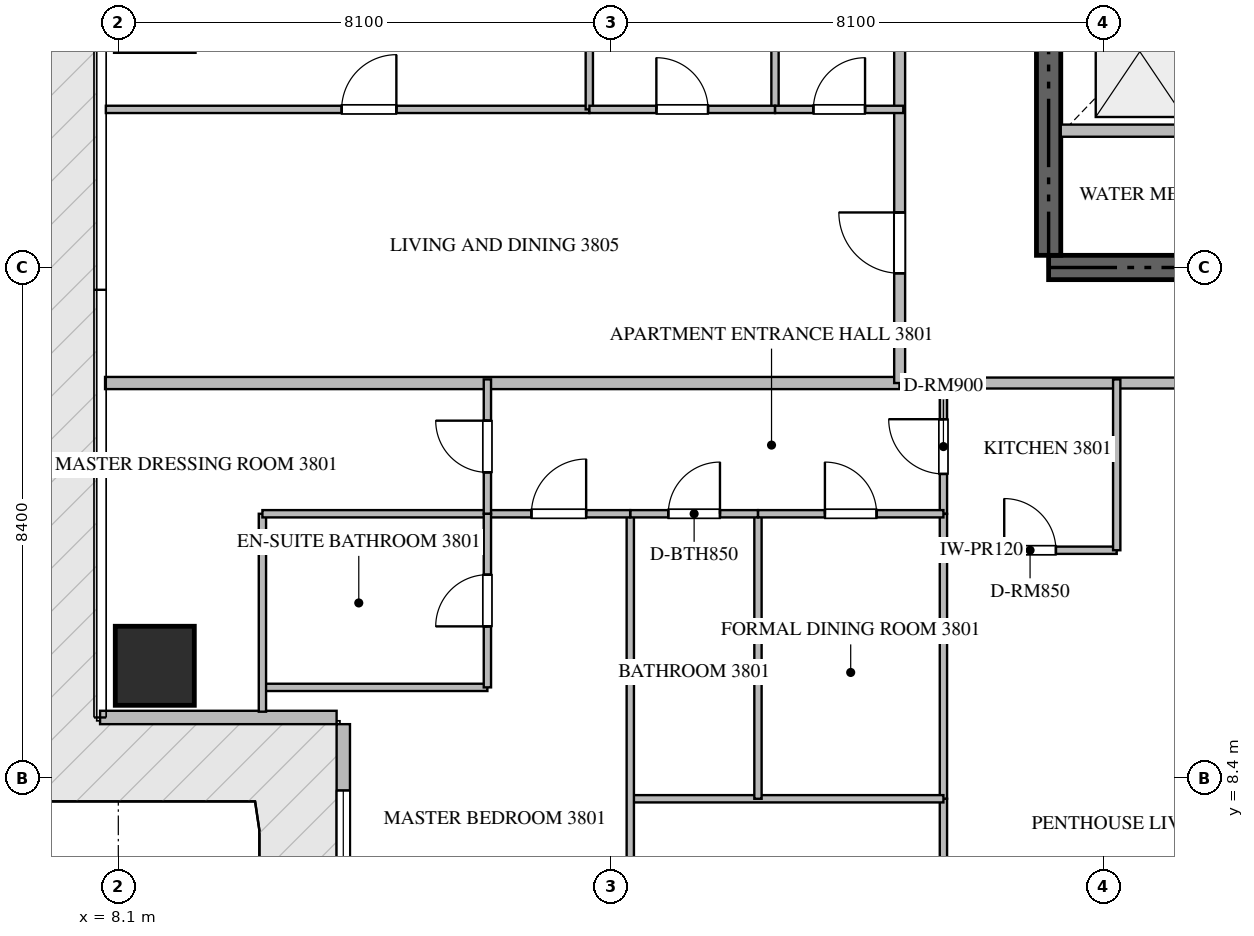
"""IFC4 building model, lengths in metres.
Left out: names, types, materials, properties, quantities, classifications, styles, units other than length and angle.
Written with IfcOpenShell. Run it as: python <this file> out.ifc"""

import sys

from ifc_helpers import new_model, si_unit, direction, frame, frame_2d, origin, origin_2d, place, context, subcontext, project, spatial, rectangle, extrude, source, transform, mapped, element, fill, save


model = new_model("IFC4")
c1 = context("Model", 3, precision=1e-05, world=origin(), true_north=direction((0.0, 1.0)))
c2 = subcontext(c1, "Body", "Model", "MODEL_VIEW")
j1 = project(units=[si_unit("LENGTHUNIT", "METRE"), si_unit("PLANEANGLEUNIT", "RADIAN")], contexts=[c1])
p1 = place(None, origin())
s1 = spatial("IfcSite", under=j1, at=p1, CompositionType="ELEMENT")
p2 = place(p1, origin())
s2 = spatial("IfcBuilding", under=s1, at=p2, CompositionType="ELEMENT")
p3 = place(p2, frame((0.0, 0.0, 153.9)))
s3 = spatial("IfcBuildingStorey", under=s2, at=p3, CompositionType="ELEMENT", Elevation=153.9)
p4 = place(p3, frame((23.4, 16.8, -0.26), z_axis=(0.0, 0.0, 1.0), x_axis=(1.0, 0.0, 0.0)))
e1 = element("IfcWall", 1, at=p4, inside=s3, PredefinedType="SHEAR", context=c2, shape_type="SweptSolid", body=[
    extrude(rectangle(XDim=18.0, YDim=0.4, at=frame_2d((9.0, 0.0))), origin(), (0.0, 0.0, 1.0), 3.748),
])
p5 = place(p3, frame((23.4, 17.0, -0.26), z_axis=(0.0, 0.0, 1.0), x_axis=(0.0, 1.0, 0.0)))
e2 = element("IfcWall", 2, at=p5, inside=s3, PredefinedType="SHEAR", context=c2, shape_type="SweptSolid", body=[
    extrude(rectangle(XDim=4.85, YDim=0.4, at=frame_2d((2.425, 0.0))), origin(), (0.0, 0.0, 1.0), 3.748),
])
m1 = source(origin(), c2, "Body", "SweptSolid", [
    extrude(rectangle(XDim=1.3, YDim=1.3, at=origin_2d()), origin(), (0.0, 0.0, 1.0), 3.75),
])
p6 = place(p3, frame((8.7, 10.25, -0.26), z_axis=(0.0, 0.0, 1.0), x_axis=(1.0, 0.0, 0.0)))
e3 = element("IfcColumn", 3, at=p6, inside=s3, PredefinedType="COLUMN", context=c2, shape_type="MappedRepresentation", body=[
    mapped(m1, transform((0.0, 0.0, 0.0), scale=1.0)),
])
p7 = place(p3, frame((7.8, 9.4, 0.0), z_axis=(0.0, 0.0, 1.0), x_axis=(1.0, 0.0, 0.0)))
e4 = element("IfcWall", 4, at=p7, inside=s3, PredefinedType="ELEMENTEDWALL", context=c2, shape_type="SweptSolid", body=[
    extrude(rectangle(XDim=3.89, YDim=0.22, at=frame_2d((1.945, 0.0))), origin(), (0.0, 0.0, 1.0), 3.475),
])
p8 = place(p3, frame((11.8, 9.29, 0.0), z_axis=(0.0, 0.0, 1.0), x_axis=(0.0, -1.0, 0.0)))
e5 = element("IfcWall", 5, at=p8, inside=s3, PredefinedType="ELEMENTEDWALL", context=c2, shape_type="SweptSolid", body=[
    extrude(rectangle(XDim=3.78, YDim=0.22, at=frame_2d((1.89, 0.0))), origin(), (0.0, 0.0, 1.0), 3.475),
])
p9 = place(p8, frame((1.09, 0.0, 0.65)))
e6 = element("IfcOpeningElement", 6, at=p9, cuts=e5, PredefinedType="OPENING", context=c2, shape_type="SweptSolid", body=[
    extrude(rectangle(XDim=1.6, YDim=2.1, at=frame_2d((0.8, 1.05))), frame((0.0, 0.12, 0.0), z_axis=(0.0, -1.0, 0.0), x_axis=(1.0, 0.0, 0.0)), (0.0, 0.0, 1.0), 0.24),
])
p10 = place(p3, frame((23.6, 19.05, 0.0), z_axis=(0.0, 0.0, 1.0), x_axis=(1.0, 0.0, 0.0)))
e7 = element("IfcWall", 7, at=p10, inside=s3, PredefinedType="STANDARD", context=c2, shape_type="SweptSolid", body=[
    extrude(rectangle(XDim=2.45, YDim=0.2, at=frame_2d((1.225, 0.0))), origin(), (0.0, 0.0, 1.0), 3.49),
])
p11 = place(p3, frame((7.882, 14.9, 0.0), z_axis=(0.0, 0.0, 1.0), x_axis=(1.0, 0.0, 0.0)))
e8 = element("IfcWall", 8, at=p11, inside=s3, PredefinedType="PARTITIONING", context=c2, shape_type="SweptSolid", body=[
    extrude(rectangle(XDim=13.068, YDim=0.2, at=frame_2d((6.534, 0.0))), origin(), (0.0, 0.0, 1.0), 3.49),
])
p12 = place(p3, frame((20.952, 14.9, 0.0), z_axis=(0.0, 0.0, 1.0), x_axis=(1.0, 0.0, 0.0)))
e9 = element("IfcWall", 9, at=p12, inside=s3, PredefinedType="PARTITIONING", context=c2, shape_type="SweptSolid", body=[
    extrude(rectangle(XDim=22.896, YDim=0.18, at=frame_2d((11.448, 0.0))), origin(), (0.0, 0.0, 1.0), 3.49),
])
p13 = place(p12, frame((5.934, 0.0, 0.0)))
e10 = element("IfcOpeningElement", 10, at=p13, cuts=e9, PredefinedType="OPENING", context=c2, shape_type="SweptSolid", body=[
    extrude(rectangle(XDim=1.0, YDim=2.15, at=frame_2d((0.5, 1.075))), frame((0.0, 0.1, 0.0), z_axis=(0.0, -1.0, 0.0), x_axis=(1.0, 0.0, 0.0)), (0.0, 0.0, 1.0), 0.2),
])
p14 = place(p12, frame((16.51, 0.0, 0.0)))
e11 = element("IfcOpeningElement", 11, at=p14, cuts=e9, PredefinedType="OPENING", context=c2, shape_type="SweptSolid", body=[
    extrude(rectangle(XDim=1.0, YDim=2.15, at=frame_2d((0.5, 1.075))), frame((0.0, 0.1, 0.0), z_axis=(0.0, -1.0, 0.0), x_axis=(1.0, 0.0, 0.0)), (0.0, 0.0, 1.0), 0.2),
])
p15 = place(p3, frame((20.95, 14.9, 0.0), z_axis=(0.0, 0.0, 1.0), x_axis=(0.0, 1.0, 0.0)))
e12 = element("IfcWall", 12, at=p15, inside=s3, PredefinedType="PARTITIONING", context=c2, shape_type="SweptSolid", body=[
    extrude(rectangle(XDim=18.7, YDim=0.18, at=frame_2d((9.35, 0.0))), origin(), (0.0, 0.0, 1.0), 3.49),
])
p16 = place(p15, frame((1.805, 0.0, 0.0)))
e13 = element("IfcOpeningElement", 13, at=p16, cuts=e12, PredefinedType="OPENING", context=c2, shape_type="SweptSolid", body=[
    extrude(rectangle(XDim=1.0, YDim=2.15, at=frame_2d((0.5, 1.075))), frame((0.0, 0.1, 0.0), z_axis=(0.0, -1.0, 0.0), x_axis=(1.0, 0.0, 0.0)), (0.0, 0.0, 1.0), 0.2),
])
p17 = place(p15, frame((15.027, 0.0, 0.0)))
e14 = element("IfcOpeningElement", 14, at=p17, cuts=e12, PredefinedType="OPENING", context=c2, shape_type="SweptSolid", body=[
    extrude(rectangle(XDim=1.0, YDim=2.15, at=frame_2d((0.5, 1.075))), frame((0.0, 0.1, 0.0), z_axis=(0.0, -1.0, 0.0), x_axis=(1.0, 0.0, 0.0)), (0.0, 0.0, 1.0), 0.2),
])
p18 = place(p3, frame((21.67, 12.15, 0.0), z_axis=(0.0, 0.0, 1.0), x_axis=(1.0, 0.0, 0.0)))
e15 = element("IfcWall", 15, at=p18, inside=s3, PredefinedType="PARTITIONING", context=c2, shape_type="SweptSolid", body=[
    extrude(rectangle(XDim=2.85, YDim=0.12, at=frame_2d((1.425, 0.0))), origin(), (0.0, 0.0, 1.0), 3.49),
])
p19 = place(p18, frame((1.0, 0.0, 0.0)))
e16 = element("IfcOpeningElement", 16, at=p19, cuts=e15, PredefinedType="OPENING", context=c2, shape_type="SweptSolid", body=[
    extrude(rectangle(XDim=0.85, YDim=2.1, at=frame_2d((0.425, 1.05))), frame((0.0, 0.07, 0.0), z_axis=(0.0, -1.0, 0.0), x_axis=(1.0, 0.0, 0.0)), (0.0, 0.0, 1.0), 0.14),
])
p20 = place(p3, frame((24.52, 12.15, 0.0), z_axis=(0.0, 0.0, 1.0), x_axis=(0.0, 1.0, 0.0)))
e17 = element("IfcWall", 17, at=p20, inside=s3, PredefinedType="PARTITIONING", context=c2, shape_type="SweptSolid", body=[
    extrude(rectangle(XDim=2.81, YDim=0.12, at=frame_2d((1.405, 0.0))), origin(), (0.0, 0.0, 1.0), 3.49),
])
p21 = place(p3, frame((21.67, 12.75, 0.0), z_axis=(0.0, 0.0, 1.0), x_axis=(0.0, 1.0, 0.0)))
e18 = element("IfcWall", 18, at=p21, inside=s3, PredefinedType="PARTITIONING", context=c2, shape_type="SweptSolid", body=[
    extrude(rectangle(XDim=2.21, YDim=0.12, at=frame_2d((1.105, 0.0))), origin(), (0.0, 0.0, 1.0), 3.49),
])
p22 = place(p21, frame((0.655, 0.0, 0.0)))
e19 = element("IfcOpeningElement", 19, at=p22, cuts=e18, PredefinedType="OPENING", context=c2, shape_type="SweptSolid", body=[
    extrude(rectangle(XDim=0.9, YDim=2.1, at=frame_2d((0.45, 1.05))), frame((0.0, 0.07, 0.0), z_axis=(0.0, -1.0, 0.0), x_axis=(1.0, 0.0, 0.0)), (0.0, 0.0, 1.0), 0.14),
])
p23 = place(p3, frame((21.67, 1.495, 0.0), z_axis=(0.0, 0.0, 1.0), x_axis=(0.0, 1.0, 0.0)))
e20 = element("IfcWall", 20, at=p23, inside=s3, PredefinedType="PARTITIONING", context=c2, shape_type="SweptSolid", body=[
    extrude(rectangle(XDim=6.568, YDim=0.12, at=frame_2d((3.284, 0.0))), origin(), (0.0, 0.0, 1.0), 3.49),
])
p24 = place(p23, frame((3.117, 0.0, 0.0)))
e21 = element("IfcOpeningElement", 21, at=p24, cuts=e20, PredefinedType="OPENING", context=c2, shape_type="SweptSolid", body=[
    extrude(rectangle(XDim=0.9, YDim=2.1, at=frame_2d((0.45, 1.05))), frame((0.0, 0.07, 0.0), z_axis=(0.0, -1.0, 0.0), x_axis=(1.0, 0.0, 0.0)), (0.0, 0.0, 1.0), 0.14),
])
p25 = place(p3, frame((21.67, 8.065, 0.0), z_axis=(0.0, 0.0, 1.0), x_axis=(0.0, 1.0, 0.0)))
e22 = element("IfcWall", 22, at=p25, inside=s3, PredefinedType="PARTITIONING", context=c2, shape_type="SweptSolid", body=[
    extrude(rectangle(XDim=4.683, YDim=0.12, at=frame_2d((2.342, 0.0))), origin(), (0.0, 0.0, 1.0), 3.49),
])
p26 = place(p3, frame((16.52, 8.063, 0.0), z_axis=(0.0, 0.0, 1.0), x_axis=(1.0, 0.0, 0.0)))
e23 = element("IfcWall", 23, at=p26, inside=s3, PredefinedType="PARTITIONING", context=c2, shape_type="SweptSolid", body=[
    extrude(rectangle(XDim=5.15, YDim=0.12, at=frame_2d((2.575, 0.0))), origin(), (0.0, 0.0, 1.0), 3.49),
])
p27 = place(p3, frame((16.52, 1.495, 0.0), z_axis=(0.0, 0.0, 1.0), x_axis=(0.0, 1.0, 0.0)))
e24 = element("IfcWall", 24, at=p27, inside=s3, PredefinedType="PARTITIONING", context=c2, shape_type="SweptSolid", body=[
    extrude(rectangle(XDim=11.255, YDim=0.12, at=frame_2d((5.627, 0.0))), origin(), (0.0, 0.0, 1.0), 2.972),
])
p28 = place(p3, frame((18.62, 8.063, 0.0), z_axis=(0.0, 0.0, 1.0), x_axis=(0.0, 1.0, 0.0)))
e25 = element("IfcWall", 25, at=p28, inside=s3, PredefinedType="PARTITIONING", context=c2, shape_type="SweptSolid", body=[
    extrude(rectangle(XDim=4.687, YDim=0.12, at=frame_2d((2.344, 0.0))), origin(), (0.0, 0.0, 1.0), 3.49),
])
p29 = place(p3, frame((16.52, 12.75, 0.0), z_axis=(0.0, 0.0, 1.0), x_axis=(1.0, 0.0, 0.0)))
e26 = element("IfcWall", 26, at=p29, inside=s3, PredefinedType="PARTITIONING", context=c2, shape_type="SweptSolid", body=[
    extrude(rectangle(XDim=2.1, YDim=0.12, at=frame_2d((1.05, 0.0))), origin(), (0.0, 0.0, 1.0), 3.49),
])
p30 = place(p29, frame((0.625, 0.0, 0.0)))
e27 = element("IfcOpeningElement", 27, at=p30, cuts=e26, PredefinedType="OPENING", context=c2, shape_type="SweptSolid", body=[
    extrude(rectangle(XDim=0.85, YDim=2.1, at=frame_2d((0.425, 1.05))), frame((0.0, 0.07, 0.0), z_axis=(0.0, -1.0, 0.0), x_axis=(1.0, 0.0, 0.0)), (0.0, 0.0, 1.0), 0.14),
])
p31 = place(p3, frame((18.622, 12.75, 0.0), z_axis=(0.0, 0.0, 1.0), x_axis=(1.0, 0.0, 0.0)))
e28 = element("IfcWall", 28, at=p31, inside=s3, PredefinedType="PARTITIONING", context=c2, shape_type="SweptSolid", body=[
    extrude(rectangle(XDim=3.048, YDim=0.12, at=frame_2d((1.524, 0.0))), origin(), (0.0, 0.0, 1.0), 3.49),
])
p32 = place(p31, frame((1.099, 0.0, 0.0)))
e29 = element("IfcOpeningElement", 29, at=p32, cuts=e28, PredefinedType="OPENING", context=c2, shape_type="SweptSolid", body=[
    extrude(rectangle(XDim=0.85, YDim=2.1, at=frame_2d((0.425, 1.05))), frame((0.0, 0.07, 0.0), z_axis=(0.0, -1.0, 0.0), x_axis=(1.0, 0.0, 0.0)), (0.0, 0.0, 1.0), 0.14),
])
p33 = place(p3, frame((14.17, 12.75, 0.0), z_axis=(0.0, 0.0, 1.0), x_axis=(1.0, 0.0, 0.0)))
e30 = element("IfcWall", 30, at=p33, inside=s3, PredefinedType="PARTITIONING", context=c2, shape_type="SweptSolid", body=[
    extrude(rectangle(XDim=2.348, YDim=0.12, at=frame_2d((1.174, 0.0))), origin(), (0.0, 0.0, 1.0), 3.49),
])
p34 = place(p33, frame((0.724, 0.0, 0.0)))
e31 = element("IfcOpeningElement", 31, at=p34, cuts=e30, PredefinedType="OPENING", context=c2, shape_type="SweptSolid", body=[
    extrude(rectangle(XDim=0.9, YDim=2.1, at=frame_2d((0.45, 1.05))), frame((0.0, 0.07, 0.0), z_axis=(0.0, -1.0, 0.0), x_axis=(1.0, 0.0, 0.0)), (0.0, 0.0, 1.0), 0.14),
])
p35 = place(p3, frame((10.47, 9.895, 0.0), z_axis=(0.0, 0.0, 1.0), x_axis=(1.0, 0.0, 0.0)))
e32 = element("IfcWall", 32, at=p35, inside=s3, PredefinedType="PARTITIONING", context=c2, shape_type="SweptSolid", body=[
    extrude(rectangle(XDim=3.7, YDim=0.12, at=frame_2d((1.85, 0.0))), origin(), (0.0, 0.0, 1.0), 3.49),
])
p36 = place(p3, frame((10.47, 9.495, 0.0), z_axis=(0.0, 0.0, 1.0), x_axis=(0.0, 1.0, 0.0)))
e33 = element("IfcWall", 33, at=p36, inside=s3, PredefinedType="PARTITIONING", context=c2, shape_type="SweptSolid", body=[
    extrude(rectangle(XDim=3.255, YDim=0.12, at=frame_2d((1.627, 0.0))), origin(), (0.0, 0.0, 1.0), 3.49),
])
p37 = place(p3, frame((10.47, 12.75, 0.0), z_axis=(0.0, 0.0, 1.0), x_axis=(1.0, 0.0, 0.0)))
e34 = element("IfcWall", 34, at=p37, inside=s3, PredefinedType="PARTITIONING", context=c2, shape_type="SweptSolid", body=[
    extrude(rectangle(XDim=3.698, YDim=0.12, at=frame_2d((1.849, 0.0))), origin(), (0.0, 0.0, 1.0), 3.49),
])
p38 = place(p3, frame((14.17, 9.895, 0.0), z_axis=(0.0, 0.0, 1.0), x_axis=(0.0, 1.0, 0.0)))
e35 = element("IfcWall", 35, at=p38, inside=s3, PredefinedType="PARTITIONING", context=c2, shape_type="SweptSolid", body=[
    extrude(rectangle(XDim=2.855, YDim=0.12, at=frame_2d((1.427, 0.0))), origin(), (0.0, 0.0, 1.0), 3.49),
])
p39 = place(p38, frame((1.003, 0.0, 0.0)))
e36 = element("IfcOpeningElement", 36, at=p39, cuts=e35, PredefinedType="OPENING", context=c2, shape_type="SweptSolid", body=[
    extrude(rectangle(XDim=0.85, YDim=2.1, at=frame_2d((0.425, 1.05))), frame((0.0, 0.07, 0.0), z_axis=(0.0, -1.0, 0.0), x_axis=(1.0, 0.0, 0.0)), (0.0, 0.0, 1.0), 0.14),
])
p40 = place(p3, frame((14.17, 12.752, 0.0), z_axis=(0.0, 0.0, 1.0), x_axis=(0.0, 1.0, 0.0)))
e37 = element("IfcWall", 37, at=p40, inside=s3, PredefinedType="PARTITIONING", context=c2, shape_type="SweptSolid", body=[
    extrude(rectangle(XDim=2.208, YDim=0.12, at=frame_2d((1.104, 0.0))), origin(), (0.0, 0.0, 1.0), 3.49),
])
p41 = place(p40, frame((0.679, 0.0, 0.0)))
e38 = element("IfcOpeningElement", 38, at=p41, cuts=e37, PredefinedType="OPENING", context=c2, shape_type="SweptSolid", body=[
    extrude(rectangle(XDim=0.85, YDim=2.1, at=frame_2d((0.425, 1.05))), frame((0.0, 0.07, 0.0), z_axis=(0.0, -1.0, 0.0), x_axis=(1.0, 0.0, 0.0)), (0.0, 0.0, 1.0), 0.14),
])
p42 = place(p3, frame((7.895, 19.4, 0.0), z_axis=(0.0, 0.0, 1.0), x_axis=(1.0, 0.0, 0.0)))
e39 = element("IfcWall", 39, at=p42, inside=s3, PredefinedType="PARTITIONING", context=c2, shape_type="SweptSolid", body=[
    extrude(rectangle(XDim=7.951, YDim=0.12, at=frame_2d((3.976, 0.0))), origin(), (0.0, 0.0, 1.0), 3.49),
])
p43 = place(p42, frame((3.878, 0.0, 0.0)))
e40 = element("IfcOpeningElement", 40, at=p43, cuts=e39, PredefinedType="OPENING", context=c2, shape_type="SweptSolid", body=[
    extrude(rectangle(XDim=0.9, YDim=2.1, at=frame_2d((0.45, 1.05))), frame((0.0, 0.07, 0.0), z_axis=(0.0, -1.0, 0.0), x_axis=(1.0, 0.0, 0.0)), (0.0, 0.0, 1.0), 0.14),
])
for number, where, z_axis, x_axis in (
    (41, (15.846, 19.4, 0.0), (0.0, 0.0, 1.0), (0.0, 1.0, 0.0)),
    (42, (18.9, 19.4, 0.0), (0.0, 0.0, 1.0), (0.0, 1.0, 0.0)),
):
    element("IfcWall", number, at=place(p3, frame(where, z_axis=z_axis, x_axis=x_axis)), inside=s3, PredefinedType="PARTITIONING", context=c2, shape_type="SweptSolid", body=[
        extrude(rectangle(XDim=5.26, YDim=0.12, at=frame_2d((2.63, 0.0))), origin(), (0.0, 0.0, 1.0), 3.49),
    ])
p44 = place(p3, frame((15.848, 19.4, 0.0), z_axis=(0.0, 0.0, 1.0), x_axis=(1.0, 0.0, 0.0)))
e43 = element("IfcWall", 43, at=p44, inside=s3, PredefinedType="PARTITIONING", context=c2, shape_type="SweptSolid", body=[
    extrude(rectangle(XDim=3.052, YDim=0.12, at=frame_2d((1.526, 0.0))), origin(), (0.0, 0.0, 1.0), 3.49),
])
p45 = place(p44, frame((1.101, 0.0, 0.0)))
e44 = element("IfcOpeningElement", 44, at=p45, cuts=e43, PredefinedType="OPENING", context=c2, shape_type="SweptSolid", body=[
    extrude(rectangle(XDim=0.85, YDim=2.1, at=frame_2d((0.425, 1.05))), frame((0.0, 0.07, 0.0), z_axis=(0.0, -1.0, 0.0), x_axis=(1.0, 0.0, 0.0)), (0.0, 0.0, 1.0), 0.14),
])
p46 = place(p3, frame((18.902, 19.4, 0.0), z_axis=(0.0, 0.0, 1.0), x_axis=(1.0, 0.0, 0.0)))
e45 = element("IfcWall", 45, at=p46, inside=s3, PredefinedType="PARTITIONING", context=c2, shape_type="SweptSolid", body=[
    extrude(rectangle(XDim=2.108, YDim=0.12, at=frame_2d((1.054, 0.0))), origin(), (0.0, 0.0, 1.0), 3.49),
])
p47 = place(p46, frame((0.629, 0.0, 0.0)))
e46 = element("IfcOpeningElement", 46, at=p47, cuts=e45, PredefinedType="OPENING", context=c2, shape_type="SweptSolid", body=[
    extrude(rectangle(XDim=0.85, YDim=2.1, at=frame_2d((0.425, 1.05))), frame((0.0, 0.07, 0.0), z_axis=(0.0, -1.0, 0.0), x_axis=(1.0, 0.0, 0.0)), (0.0, 0.0, 1.0), 0.14),
])
m2 = source(origin(), c2, "Body", "SweptSolid", [
    extrude(rectangle(XDim=1.6, YDim=2.1, at=frame_2d((0.8, 1.05))), frame((0.0, 0.03, 0.0), z_axis=(0.0, -1.0, 0.0), x_axis=(1.0, 0.0, 0.0)), (0.0, 0.0, 1.0), 0.06),
])
p48 = place(p9, origin())
e47 = element("IfcWindow", 47, at=p48, inside=s3, PartitioningType="SINGLE_PANEL", PredefinedType="WINDOW", context=c2, shape_type="MappedRepresentation", body=[
    mapped(m2, transform((0.0, 0.0, 0.0), scale=1.0)),
])
fill(e6, e47)
m3 = source(origin(), c2, "Body", "SweptSolid", [
    extrude(rectangle(XDim=1.0, YDim=2.15, at=frame_2d((0.5, 1.075))), frame((0.0, 0.025, 0.0), z_axis=(0.0, -1.0, 0.0), x_axis=(1.0, 0.0, 0.0)), (0.0, 0.0, 1.0), 0.05),
])
p49 = place(p16, origin())
e48 = element("IfcDoor", 48, at=p49, inside=s3, OperationType="SINGLE_SWING_RIGHT", PredefinedType="DOOR", context=c2, shape_type="MappedRepresentation", body=[
    mapped(m3, transform((0.0, 0.0, 0.0), scale=1.0)),
])
fill(e13, e48)
m4 = source(origin(), c2, "Body", "SweptSolid", [
    extrude(rectangle(XDim=0.85, YDim=2.1, at=frame_2d((0.425, 1.05))), frame((0.0, 0.025, 0.0), z_axis=(0.0, -1.0, 0.0), x_axis=(1.0, 0.0, 0.0)), (0.0, 0.0, 1.0), 0.05),
])
p50 = place(p19, origin())
e49 = element("IfcDoor", 49, at=p50, inside=s3, OperationType="SINGLE_SWING_LEFT", PredefinedType="DOOR", context=c2, shape_type="MappedRepresentation", body=[
    mapped(m4, transform((0.0, 0.0, 0.0), scale=1.0)),
])
fill(e16, e49)
m5 = source(origin(), c2, "Body", "SweptSolid", [
    extrude(rectangle(XDim=0.9, YDim=2.1, at=frame_2d((0.45, 1.05))), frame((0.0, 0.025, 0.0), z_axis=(0.0, -1.0, 0.0), x_axis=(1.0, 0.0, 0.0)), (0.0, 0.0, 1.0), 0.05),
])
p51 = place(p22, origin())
e50 = element("IfcDoor", 50, at=p51, inside=s3, OperationType="SINGLE_SWING_RIGHT", PredefinedType="DOOR", context=c2, shape_type="MappedRepresentation", body=[
    mapped(m5, transform((0.0, 0.0, 0.0), scale=1.0)),
])
fill(e19, e50)
p52 = place(p30, origin())
e51 = element("IfcDoor", 51, at=p52, inside=s3, OperationType="SINGLE_SWING_RIGHT", PredefinedType="DOOR", context=c2, shape_type="MappedRepresentation", body=[
    mapped(m4, transform((0.0, 0.0, 0.0), scale=1.0)),
])
fill(e27, e51)
p53 = place(p32, origin())
e52 = element("IfcDoor", 52, at=p53, inside=s3, OperationType="SINGLE_SWING_LEFT", PredefinedType="DOOR", context=c2, shape_type="MappedRepresentation", body=[
    mapped(m4, transform((0.0, 0.0, 0.0), scale=1.0)),
])
fill(e29, e52)
p54 = place(p34, origin())
e53 = element("IfcDoor", 53, at=p54, inside=s3, OperationType="SINGLE_SWING_RIGHT", PredefinedType="DOOR", context=c2, shape_type="MappedRepresentation", body=[
    mapped(m5, transform((0.0, 0.0, 0.0), scale=1.0)),
])
fill(e31, e53)
p55 = place(p39, origin())
e54 = element("IfcDoor", 54, at=p55, inside=s3, OperationType="SINGLE_SWING_LEFT", PredefinedType="DOOR", context=c2, shape_type="MappedRepresentation", body=[
    mapped(m4, transform((0.0, 0.0, 0.0), scale=1.0)),
])
fill(e36, e54)
p56 = place(p41, origin())
e55 = element("IfcDoor", 55, at=p56, inside=s3, OperationType="SINGLE_SWING_RIGHT", PredefinedType="DOOR", context=c2, shape_type="MappedRepresentation", body=[
    mapped(m4, transform((0.0, 0.0, 0.0), scale=1.0)),
])
fill(e38, e55)
p57 = place(p43, origin())
e56 = element("IfcDoor", 56, at=p57, inside=s3, OperationType="SINGLE_SWING_RIGHT", PredefinedType="DOOR", context=c2, shape_type="MappedRepresentation", body=[
    mapped(m5, transform((0.0, 0.0, 0.0), scale=1.0)),
])
fill(e40, e56)
p58 = place(p45, origin())
e57 = element("IfcDoor", 57, at=p58, inside=s3, OperationType="SINGLE_SWING_LEFT", PredefinedType="DOOR", context=c2, shape_type="MappedRepresentation", body=[
    mapped(m4, transform((0.0, 0.0, 0.0), scale=1.0)),
])
fill(e44, e57)
p59 = place(p47, origin())
e58 = element("IfcDoor", 58, at=p59, inside=s3, OperationType="SINGLE_SWING_RIGHT", PredefinedType="DOOR", context=c2, shape_type="MappedRepresentation", body=[
    mapped(m4, transform((0.0, 0.0, 0.0), scale=1.0)),
])
fill(e46, e58)
save(model, sys.argv[1])
